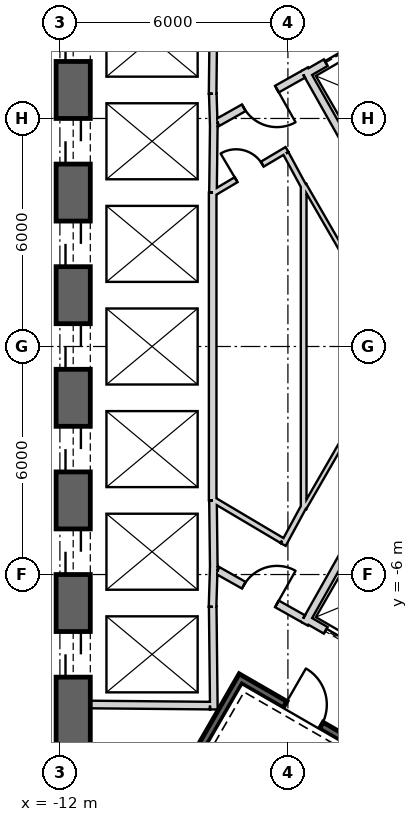
"""IFC4 building model, lengths in metres.
Left out: names, types, materials, properties, quantities, classifications, styles, units other than length and angle.
Written with IfcOpenShell. Run it as: python <this file> out.ifc"""

import sys

from ifc_helpers import new_model, si_unit, direction, frame, frame_2d, origin, place, context, subcontext, project, spatial, rectangle, extrude, element, fill, save


model = new_model("IFC4")
c1 = context("Model", 3, precision=1e-05, world=origin(), true_north=direction((0.0, 1.0)))
c2 = subcontext(c1, "Body", "Model", "MODEL_VIEW")
j1 = project(units=[si_unit("LENGTHUNIT", "METRE"), si_unit("PLANEANGLEUNIT", "RADIAN")], contexts=[c1])
p1 = place(None, origin())
s1 = spatial("IfcSite", under=j1, at=p1, CompositionType="ELEMENT")
p2 = place(p1, origin())
s2 = spatial("IfcBuilding", under=s1, at=p2, CompositionType="ELEMENT")
p3 = place(p2, frame((0.0, 0.0, 392.3)))
s3 = spatial("IfcBuildingStorey", under=s2, at=p3, CompositionType="ELEMENT", Elevation=392.3)
p4 = place(p3, frame((19.475, 2.208, 0.0), z_axis=(0.0, 0.0, 1.0), x_axis=(-0.866028369851, 0.499994862586, 0.0)))
e1 = element("IfcWall", 1, at=p4, inside=s3, PredefinedType="SHEAR", context=c2, shape_type="SweptSolid", body=[
    extrude(rectangle(XDim=31.523, YDim=0.9, at=frame_2d((15.762, 0.0))), origin(), (0.0, 0.0, 1.0), 6.0),
])
p5 = place(p4, frame((7.062, 0.0, 0.0)))
e2 = element("IfcOpeningElement", 2, at=p5, cuts=e1, PredefinedType="OPENING", context=c2, shape_type="SweptSolid", body=[
    extrude(rectangle(XDim=1.2, YDim=2.4, at=frame_2d((0.6, 1.2))), frame((0.0, 0.46, 0.0), z_axis=(0.0, -1.0, 0.0), x_axis=(1.0, 0.0, 0.0)), (0.0, 0.0, 1.0), 0.92),
])
p6 = place(p4, frame((3.612, 0.0, 0.0)))
e3 = element("IfcOpeningElement", 3, at=p6, cuts=e1, PredefinedType="OPENING", context=c2, shape_type="SweptSolid", body=[
    extrude(rectangle(XDim=1.2, YDim=2.4, at=frame_2d((0.6, 1.2))), frame((0.0, 0.46, 0.0), z_axis=(0.0, -1.0, 0.0), x_axis=(1.0, 0.0, 0.0)), (0.0, 0.0, 1.0), 0.92),
])
p7 = place(p4, frame((26.712, 0.0, 0.0)))
e4 = element("IfcOpeningElement", 4, at=p7, cuts=e1, PredefinedType="OPENING", context=c2, shape_type="SweptSolid", body=[
    extrude(rectangle(XDim=1.2, YDim=2.4, at=frame_2d((0.6, 1.2))), frame((0.0, 0.46, 0.0), z_axis=(0.0, -1.0, 0.0), x_axis=(1.0, 0.0, 0.0)), (0.0, 0.0, 1.0), 0.92),
])
p8 = place(p3, frame((-11.65, 15.762, 0.0), z_axis=(0.0, 0.0, 1.0), x_axis=(0.0, -1.0, 0.0)))
e5 = element("IfcWall", 5, at=p8, inside=s3, PredefinedType="SHEAR", context=c2, shape_type="SweptSolid", body=[
    extrude(rectangle(XDim=31.523, YDim=0.9, at=frame_2d((15.762, 0.0))), origin(), (0.0, 0.0, 1.0), 6.0),
])
p9 = place(p8, frame((7.062, 0.0, 0.0)))
e6 = element("IfcOpeningElement", 6, at=p9, cuts=e5, PredefinedType="OPENING", context=c2, shape_type="SweptSolid", body=[
    extrude(rectangle(XDim=1.2, YDim=2.4, at=frame_2d((0.6, 1.2))), frame((0.0, 0.46, 0.0), z_axis=(0.0, -1.0, 0.0), x_axis=(1.0, 0.0, 0.0)), (0.0, 0.0, 1.0), 0.92),
])
p10 = place(p8, frame((9.762, 0.0, 0.0)))
e7 = element("IfcOpeningElement", 7, at=p10, cuts=e5, PredefinedType="OPENING", context=c2, shape_type="SweptSolid", body=[
    extrude(rectangle(XDim=1.2, YDim=2.4, at=frame_2d((0.6, 1.2))), frame((0.0, 0.46, 0.0), z_axis=(0.0, -1.0, 0.0), x_axis=(1.0, 0.0, 0.0)), (0.0, 0.0, 1.0), 0.92),
])
p11 = place(p8, frame((12.462, 0.0, 0.0)))
e8 = element("IfcOpeningElement", 8, at=p11, cuts=e5, PredefinedType="OPENING", context=c2, shape_type="SweptSolid", body=[
    extrude(rectangle(XDim=1.2, YDim=2.4, at=frame_2d((0.6, 1.2))), frame((0.0, 0.46, 0.0), z_axis=(0.0, -1.0, 0.0), x_axis=(1.0, 0.0, 0.0)), (0.0, 0.0, 1.0), 0.92),
])
p12 = place(p8, frame((15.162, 0.0, 0.0)))
e9 = element("IfcOpeningElement", 9, at=p12, cuts=e5, PredefinedType="OPENING", context=c2, shape_type="SweptSolid", body=[
    extrude(rectangle(XDim=1.2, YDim=2.4, at=frame_2d((0.6, 1.2))), frame((0.0, 0.46, 0.0), z_axis=(0.0, -1.0, 0.0), x_axis=(1.0, 0.0, 0.0)), (0.0, 0.0, 1.0), 0.92),
])
p13 = place(p8, frame((17.862, 0.0, 0.0)))
e10 = element("IfcOpeningElement", 10, at=p13, cuts=e5, PredefinedType="OPENING", context=c2, shape_type="SweptSolid", body=[
    extrude(rectangle(XDim=1.2, YDim=2.4, at=frame_2d((0.6, 1.2))), frame((0.0, 0.46, 0.0), z_axis=(0.0, -1.0, 0.0), x_axis=(1.0, 0.0, 0.0)), (0.0, 0.0, 1.0), 0.92),
])
p14 = place(p8, frame((20.562, 0.0, 0.0)))
e11 = element("IfcOpeningElement", 11, at=p14, cuts=e5, PredefinedType="OPENING", context=c2, shape_type="SweptSolid", body=[
    extrude(rectangle(XDim=1.2, YDim=2.4, at=frame_2d((0.6, 1.2))), frame((0.0, 0.46, 0.0), z_axis=(0.0, -1.0, 0.0), x_axis=(1.0, 0.0, 0.0)), (0.0, 0.0, 1.0), 0.92),
])
p15 = place(p8, frame((23.262, 0.0, 0.0)))
e12 = element("IfcOpeningElement", 12, at=p15, cuts=e5, PredefinedType="OPENING", context=c2, shape_type="SweptSolid", body=[
    extrude(rectangle(XDim=1.2, YDim=2.4, at=frame_2d((0.6, 1.2))), frame((0.0, 0.46, 0.0), z_axis=(0.0, -1.0, 0.0), x_axis=(1.0, 0.0, 0.0)), (0.0, 0.0, 1.0), 0.92),
])
p16 = place(p8, frame((3.612, 0.0, 0.0)))
e13 = element("IfcOpeningElement", 13, at=p16, cuts=e5, PredefinedType="OPENING", context=c2, shape_type="SweptSolid", body=[
    extrude(rectangle(XDim=1.2, YDim=2.4, at=frame_2d((0.6, 1.2))), frame((0.0, 0.46, 0.0), z_axis=(0.0, -1.0, 0.0), x_axis=(1.0, 0.0, 0.0)), (0.0, 0.0, 1.0), 0.92),
])
p17 = place(p8, frame((26.712, 0.0, 0.0)))
e14 = element("IfcOpeningElement", 14, at=p17, cuts=e5, PredefinedType="OPENING", context=c2, shape_type="SweptSolid", body=[
    extrude(rectangle(XDim=1.2, YDim=2.4, at=frame_2d((0.6, 1.2))), frame((0.0, 0.46, 0.0), z_axis=(0.0, -1.0, 0.0), x_axis=(1.0, 0.0, 0.0)), (0.0, 0.0, 1.0), 0.92),
])
p18 = place(p3, frame((-7.825, -17.97, 0.0), z_axis=(0.0, 0.0, 1.0), x_axis=(0.866028369851, 0.499994862586, 0.0)))
e15 = element("IfcWall", 15, at=p18, inside=s3, PredefinedType="SHEAR", context=c2, shape_type="SweptSolid", body=[
    extrude(rectangle(XDim=31.523, YDim=0.9, at=frame_2d((15.762, 0.0))), origin(), (0.0, 0.0, 1.0), 6.0),
])
p19 = place(p18, frame((7.062, 0.0, 0.0)))
e16 = element("IfcOpeningElement", 16, at=p19, cuts=e15, PredefinedType="OPENING", context=c2, shape_type="SweptSolid", body=[
    extrude(rectangle(XDim=1.2, YDim=2.4, at=frame_2d((0.6, 1.2))), frame((0.0, 0.46, 0.0), z_axis=(0.0, -1.0, 0.0), x_axis=(1.0, 0.0, 0.0)), (0.0, 0.0, 1.0), 0.92),
])
p20 = place(p18, frame((9.762, 0.0, 0.0)))
e17 = element("IfcOpeningElement", 17, at=p20, cuts=e15, PredefinedType="OPENING", context=c2, shape_type="SweptSolid", body=[
    extrude(rectangle(XDim=1.2, YDim=2.4, at=frame_2d((0.6, 1.2))), frame((0.0, 0.46, 0.0), z_axis=(0.0, -1.0, 0.0), x_axis=(1.0, 0.0, 0.0)), (0.0, 0.0, 1.0), 0.92),
])
p21 = place(p18, frame((17.862, 0.0, 0.0)))
e18 = element("IfcOpeningElement", 18, at=p21, cuts=e15, PredefinedType="OPENING", context=c2, shape_type="SweptSolid", body=[
    extrude(rectangle(XDim=1.2, YDim=2.4, at=frame_2d((0.6, 1.2))), frame((0.0, 0.46, 0.0), z_axis=(0.0, -1.0, 0.0), x_axis=(1.0, 0.0, 0.0)), (0.0, 0.0, 1.0), 0.92),
])
p22 = place(p18, frame((20.562, 0.0, 0.0)))
e19 = element("IfcOpeningElement", 19, at=p22, cuts=e15, PredefinedType="OPENING", context=c2, shape_type="SweptSolid", body=[
    extrude(rectangle(XDim=1.2, YDim=2.4, at=frame_2d((0.6, 1.2))), frame((0.0, 0.46, 0.0), z_axis=(0.0, -1.0, 0.0), x_axis=(1.0, 0.0, 0.0)), (0.0, 0.0, 1.0), 0.92),
])
p23 = place(p18, frame((26.712, 0.0, 0.0)))
e20 = element("IfcOpeningElement", 20, at=p23, cuts=e15, PredefinedType="OPENING", context=c2, shape_type="SweptSolid", body=[
    extrude(rectangle(XDim=1.2, YDim=2.4, at=frame_2d((0.6, 1.2))), frame((0.0, 0.46, 0.0), z_axis=(0.0, -1.0, 0.0), x_axis=(1.0, 0.0, 0.0)), (0.0, 0.0, 1.0), 0.92),
])
p24 = place(p18, frame((3.612, 0.0, 0.0)))
e21 = element("IfcOpeningElement", 21, at=p24, cuts=e15, PredefinedType="OPENING", context=c2, shape_type="SweptSolid", body=[
    extrude(rectangle(XDim=1.2, YDim=2.4, at=frame_2d((0.6, 1.2))), frame((0.0, 0.46, 0.0), z_axis=(0.0, -1.0, 0.0), x_axis=(1.0, 0.0, 0.0)), (0.0, 0.0, 1.0), 0.92),
])
p25 = place(p3, frame((-7.951, 9.35, 0.0), z_axis=(0.0, 0.0, 1.0), x_axis=(-0.011120469654, -0.999938165666, 0.0)))
e22 = element("IfcWall", 22, at=p25, inside=s3, PredefinedType="PLUMBINGWALL", context=c2, shape_type="SweptSolid", body=[
    extrude(rectangle(XDim=2.7, YDim=0.2, at=frame_2d((1.35, 0.0))), origin(), (0.0, 0.0, 1.0), 5.7),
])
p26 = place(p3, frame((-7.977, 6.65, 0.0), z_axis=(0.0, 0.0, 1.0), x_axis=(0.030861509705, -0.999523670164, 0.0)))
e23 = element("IfcWall", 23, at=p26, inside=s3, PredefinedType="PLUMBINGWALL", context=c2, shape_type="SweptSolid", body=[
    extrude(rectangle(XDim=0.878, YDim=0.2, at=frame_2d((0.439, 0.0))), origin(), (0.0, 0.0, 1.0), 5.7),
])
p27 = place(p3, frame((-7.949, 5.895, 0.0), z_axis=(0.0, 0.0, 1.0), x_axis=(-0.012042535896, -0.999927486035, 0.0)))
e24 = element("IfcWall", 24, at=p27, inside=s3, PredefinedType="PLUMBINGWALL", context=c2, shape_type="SweptSolid", body=[
    extrude(rectangle(XDim=1.845, YDim=0.2, at=frame_2d((0.922, 0.0))), origin(), (0.0, 0.0, 1.0), 5.7),
])
p28 = place(p3, frame((-7.98, 4.05, 0.0), z_axis=(0.0, 0.0, 1.0), x_axis=(0.0, -1.0, 0.0)))
e25 = element("IfcWall", 25, at=p28, inside=s3, PredefinedType="PLUMBINGWALL", context=c2, shape_type="SweptSolid", body=[
    extrude(rectangle(XDim=8.1, YDim=0.2, at=frame_2d((4.05, 0.0))), origin(), (0.0, 0.0, 1.0), 5.7),
])
p29 = place(p3, frame((-7.95, -5.772, 0.0), z_axis=(0.0, 0.0, 1.0), x_axis=(-0.030803413295, -0.999525462272, 0.0)))
e26 = element("IfcWall", 26, at=p29, inside=s3, PredefinedType="PLUMBINGWALL", context=c2, shape_type="SweptSolid", body=[
    extrude(rectangle(XDim=1.078, YDim=0.2, at=frame_2d((0.539, 0.0))), origin(), (0.0, 0.0, 1.0), 5.7),
])
p30 = place(p3, frame((-7.971, -4.05, 0.0), z_axis=(0.0, 0.0, 1.0), x_axis=(0.012042535896, -0.999927486035, 0.0)))
e27 = element("IfcWall", 27, at=p30, inside=s3, PredefinedType="PLUMBINGWALL", context=c2, shape_type="SweptSolid", body=[
    extrude(rectangle(XDim=1.845, YDim=0.2, at=frame_2d((0.922, 0.0))), origin(), (0.0, 0.0, 1.0), 5.7),
])
p31 = place(p3, frame((-7.979, -6.85, 0.0), z_axis=(0.0, 0.0, 1.0), x_axis=(0.011121475088, -0.999938154483, 0.0)))
e28 = element("IfcWall", 28, at=p31, inside=s3, PredefinedType="PLUMBINGWALL", context=c2, shape_type="SweptSolid", body=[
    extrude(rectangle(XDim=2.7, YDim=0.2, at=frame_2d((1.35, 0.0))), origin(), (0.0, 0.0, 1.0), 5.7),
])
p32 = place(p3, frame((-8.05, -9.449, 0.0), z_axis=(0.0, 0.0, 1.0), x_axis=(-0.999957467379, 0.009222983926, 0.0)))
e29 = element("IfcWall", 29, at=p32, inside=s3, PredefinedType="PLUMBINGWALL", context=c2, shape_type="SweptSolid", body=[
    extrude(rectangle(XDim=3.15, YDim=0.2, at=frame_2d((1.575, 0.0))), origin(), (0.0, 0.0, 1.0), 5.7),
])
p33 = place(p3, frame((-5.524, 7.168, 0.0), z_axis=(0.0, 0.0, 1.0), x_axis=(0.866024647952, 0.500001309137, 0.0)))
e30 = element("IfcWall", 30, at=p33, inside=s3, PredefinedType="PLUMBINGWALL", context=c2, shape_type="SweptSolid", body=[
    extrude(rectangle(XDim=2.4, YDim=0.2, at=frame_2d((1.2, 0.0))), origin(), (0.0, 0.0, 1.0), 5.7),
])
p34 = place(p33, frame((0.6, 0.0, 0.0)))
e31 = element("IfcOpeningElement", 31, at=p34, cuts=e30, PredefinedType="OPENING", context=c2, shape_type="SweptSolid", body=[
    extrude(rectangle(XDim=1.2, YDim=2.4, at=frame_2d((0.6, 1.2))), frame((0.0, 0.11, 0.0), z_axis=(0.0, -1.0, 0.0), x_axis=(1.0, 0.0, 0.0)), (0.0, 0.0, 1.0), 0.22),
])
p35 = place(p3, frame((-5.562, 7.296, 0.0), z_axis=(0.0, 0.0, 1.0), x_axis=(0.49134651263, -0.870964180966, 0.0)))
e32 = element("IfcWall", 32, at=p35, inside=s3, PredefinedType="PLUMBINGWALL", context=c2, shape_type="SweptSolid", body=[
    extrude(rectangle(XDim=3.0, YDim=0.2, at=frame_2d((1.5, 0.0))), origin(), (0.0, 0.0, 1.0), 5.7),
])
p36 = place(p3, frame((-7.196, -8.663, -0.35), z_axis=(0.0, 0.0, 1.0), x_axis=(-0.499997992926, -0.866026562566, 0.0)))
e33 = element("IfcWall", 33, at=p36, inside=s3, PredefinedType="SHEAR", context=c2, shape_type="SweptSolid", body=[
    extrude(rectangle(XDim=7.9, YDim=0.2, at=frame_2d((3.95, 0.0))), origin(), (0.0, 0.0, 1.0), 6.05),
])
p37 = place(p3, frame((-4.041, -10.599, -0.35), z_axis=(0.0, 0.0, 1.0), x_axis=(-0.866047807691, 0.499961193289, 0.0)))
e34 = element("IfcWall", 34, at=p37, inside=s3, PredefinedType="SHEAR", context=c2, shape_type="SweptSolid", body=[
    extrude(rectangle(XDim=3.6, YDim=0.2, at=frame_2d((1.8, 0.0))), origin(), (0.0, 0.0, 1.0), 6.05),
])
p38 = place(p37, frame((1.25, 0.0, 0.35)))
e35 = element("IfcOpeningElement", 35, at=p38, cuts=e34, PredefinedType="OPENING", context=c2, shape_type="SweptSolid", body=[
    extrude(rectangle(XDim=1.1, YDim=2.1, at=frame_2d((0.55, 1.05))), frame((0.0, 0.11, 0.0), z_axis=(0.0, -1.0, 0.0), x_axis=(1.0, 0.0, 0.0)), (0.0, 0.0, 1.0), 0.22),
])
p39 = place(p3, frame((-3.446, -8.368, 0.0), z_axis=(0.0, 0.0, 1.0), x_axis=(-0.866024647952, 0.500001309137, 0.0)))
e36 = element("IfcWall", 36, at=p39, inside=s3, PredefinedType="PLUMBINGWALL", context=c2, shape_type="SweptSolid", body=[
    extrude(rectangle(XDim=2.4, YDim=0.2, at=frame_2d((1.2, 0.0))), origin(), (0.0, 0.0, 1.0), 5.7),
])
p40 = place(p39, frame((0.6, 0.0, 0.0)))
e37 = element("IfcOpeningElement", 37, at=p40, cuts=e36, PredefinedType="OPENING", context=c2, shape_type="SweptSolid", body=[
    extrude(rectangle(XDim=1.2, YDim=2.4, at=frame_2d((0.6, 1.2))), frame((0.0, 0.11, 0.0), z_axis=(0.0, -1.0, 0.0), x_axis=(1.0, 0.0, 0.0)), (0.0, 0.0, 1.0), 0.22),
])
p41 = place(p3, frame((-3.99, -4.509, 0.0), z_axis=(0.0, 0.0, 1.0), x_axis=(-0.491358283181, -0.870957540612, 0.0)))
e38 = element("IfcWall", 38, at=p41, inside=s3, PredefinedType="PLUMBINGWALL", context=c2, shape_type="SweptSolid", body=[
    extrude(rectangle(XDim=3.2, YDim=0.2, at=frame_2d((1.6, 0.0))), origin(), (0.0, 0.0, 1.0), 5.7),
])
p42 = place(p3, frame((-5.6, 7.16, 0.0), z_axis=(0.0, 0.0, 1.0), x_axis=(-0.871363259478, -0.490638431059, 0.0)))
e39 = element("IfcWall", 39, at=p42, inside=s3, PredefinedType="PARTITIONING", context=c2, shape_type="SweptSolid", body=[
    extrude(rectangle(XDim=2.581, YDim=0.2, at=frame_2d((1.291, 0.0))), origin(), (0.0, 0.0, 1.0), 5.7),
])
p43 = place(p42, frame((0.791, 0.0, 0.0)))
e40 = element("IfcOpeningElement", 40, at=p43, cuts=e39, PredefinedType="OPENING", context=c2, shape_type="SweptSolid", body=[
    extrude(rectangle(XDim=1.0, YDim=2.1, at=frame_2d((0.5, 1.05))), frame((0.0, 0.11, 0.0), z_axis=(0.0, -1.0, 0.0), x_axis=(1.0, 0.0, 0.0)), (0.0, 0.0, 1.0), 0.22),
])
p44 = place(p3, frame((-7.849, -5.894, 0.0), z_axis=(0.0, 0.0, 1.0), x_axis=(0.871363259478, -0.490638431059, 0.0)))
e41 = element("IfcWall", 41, at=p44, inside=s3, PredefinedType="PARTITIONING", context=c2, shape_type="SweptSolid", body=[
    extrude(rectangle(XDim=2.581, YDim=0.2, at=frame_2d((1.291, 0.0))), origin(), (0.0, 0.0, 1.0), 5.7),
])
p45 = place(p44, frame((0.791, 0.0, 0.0)))
e42 = element("IfcOpeningElement", 42, at=p45, cuts=e41, PredefinedType="OPENING", context=c2, shape_type="SweptSolid", body=[
    extrude(rectangle(XDim=1.0, YDim=2.1, at=frame_2d((0.5, 1.05))), frame((0.0, 0.11, 0.0), z_axis=(0.0, -1.0, 0.0), x_axis=(1.0, 0.0, 0.0)), (0.0, 0.0, 1.0), 0.22),
])
p46 = place(p3, frame((-5.586, -4.275, 0.0), z_axis=(0.0, 0.0, 1.0), x_axis=(0.0, 1.0, 0.0)))
e43 = element("IfcWall", 43, at=p46, inside=s3, PredefinedType="PLUMBINGWALL", context=c2, shape_type="SweptSolid", body=[
    extrude(rectangle(XDim=8.549, YDim=0.15, at=frame_2d((4.275, 0.0))), origin(), (0.0, 0.0, 1.0), 5.7),
])
p47 = place(p3, frame((-6.124, -5.211, 0.0), z_axis=(0.0, 0.0, 1.0), x_axis=(0.476228984866, 0.879321303036, 0.0)))
e44 = element("IfcWall", 44, at=p47, inside=s3, PredefinedType="PLUMBINGWALL", context=c2, shape_type="SweptSolid", body=[
    extrude(rectangle(XDim=1.162, YDim=0.15, at=frame_2d((0.581, 0.0))), origin(), (0.0, 0.0, 1.0), 5.7),
])
p48 = place(p3, frame((-7.95, -4.041, 0.0), z_axis=(0.0, 0.0, 1.0), x_axis=(0.860090281069, -0.510141851263, 0.0)))
e45 = element("IfcWall", 45, at=p48, inside=s3, PredefinedType="PLUMBINGWALL", context=c2, shape_type="SweptSolid", body=[
    extrude(rectangle(XDim=2.089, YDim=0.15, at=frame_2d((1.045, 0.0))), origin(), (0.0, 0.0, 1.0), 5.7),
])
p49 = place(p3, frame((-6.024, 5.183, 0.0), z_axis=(0.0, 0.0, 1.0), x_axis=(-0.860126804455, -0.510080268447, 0.0)))
e46 = element("IfcWall", 46, at=p49, inside=s3, PredefinedType="PLUMBINGWALL", context=c2, shape_type="SweptSolid", body=[
    extrude(rectangle(XDim=2.24, YDim=0.15, at=frame_2d((1.12, 0.0))), origin(), (0.0, 0.0, 1.0), 5.7),
])
p50 = place(p49, frame((0.757, 0.0, 0.0)))
e47 = element("IfcOpeningElement", 47, at=p50, cuts=e46, PredefinedType="OPENING", context=c2, shape_type="SweptSolid", body=[
    extrude(rectangle(XDim=0.8, YDim=2.1, at=frame_2d((0.4, 1.05))), frame((0.0, 0.085, 0.0), z_axis=(0.0, -1.0, 0.0), x_axis=(1.0, 0.0, 0.0)), (0.0, 0.0, 1.0), 0.17),
])
p51 = place(p3, frame((-5.571, 4.19, 0.0), z_axis=(0.0, 0.0, 1.0), x_axis=(-0.476127658675, 0.879376172434, 0.0)))
e48 = element("IfcWall", 48, at=p51, inside=s3, PredefinedType="PLUMBINGWALL", context=c2, shape_type="SweptSolid", body=[
    extrude(rectangle(XDim=1.012, YDim=0.15, at=frame_2d((0.506, 0.0))), origin(), (0.0, 0.0, 1.0), 5.7),
])
p52 = place(p3, frame((-4.558, 2.495, 0.0), z_axis=(0.0, 0.0, 1.0), x_axis=(-0.499990325971, 0.866030989016, 0.0)))
e49 = element("IfcWall", 49, at=p52, inside=s3, PredefinedType="PARTITIONING", context=c2, shape_type="SweptSolid", body=[
    extrude(rectangle(XDim=2.025, YDim=0.12, at=frame_2d((1.012, 0.0))), origin(), (0.0, 0.0, 1.0), 5.7),
])
p53 = place(p3, frame((-4.64, -2.517, 0.0), z_axis=(0.0, 0.0, 1.0), x_axis=(0.865989465428, -0.500062241894, 0.0)))
e50 = element("IfcWall", 50, at=p53, inside=s3, PredefinedType="PARTITIONING", context=c2, shape_type="SweptSolid", body=[
    extrude(rectangle(XDim=1.7, YDim=0.12, at=frame_2d((0.85, 0.0))), origin(), (0.0, 0.0, 1.0), 5.7),
])
p54 = place(p3, frame((-5.571, -4.249, 0.0), z_axis=(0.0, 0.0, 1.0), x_axis=(0.500081145431, 0.865978549379, 0.0)))
e51 = element("IfcWall", 51, at=p54, inside=s3, PredefinedType="PARTITIONING", context=c2, shape_type="SweptSolid", body=[
    extrude(rectangle(XDim=1.905, YDim=0.12, at=frame_2d((0.953, 0.0))), origin(), (0.0, 0.0, 1.0), 5.7),
])
p55 = place(p43, origin())
e52 = element("IfcDoor", 52, at=p55, inside=s3, OperationType="SINGLE_SWING_LEFT", PredefinedType="USERDEFINED", context=c2, shape_type="SweptSolid", body=[
    extrude(rectangle(XDim=1.0, YDim=2.1, at=frame_2d((0.5, 1.05))), frame((0.0, 0.025, 0.0), z_axis=(0.0, -1.0, 0.0), x_axis=(1.0, 0.0, 0.0)), (0.0, 0.0, 1.0), 0.05),
])
fill(e40, e52)
p56 = place(p34, origin())
e53 = element("IfcDoor", 53, at=p56, inside=s3, OperationType="SLIDING_TO_LEFT", PredefinedType="USERDEFINED", context=c2, shape_type="SweptSolid", body=[
    extrude(rectangle(XDim=1.2, YDim=2.4, at=frame_2d((0.6, 1.2))), frame((0.0, 0.025, 0.0), z_axis=(0.0, -1.0, 0.0), x_axis=(1.0, 0.0, 0.0)), (0.0, 0.0, 1.0), 0.05),
])
fill(e31, e53)
p57 = place(p38, origin())
e54 = element("IfcDoor", 54, at=p57, inside=s3, OperationType="SINGLE_SWING_RIGHT", PredefinedType="USERDEFINED", context=c2, shape_type="SweptSolid", body=[
    extrude(rectangle(XDim=1.1, YDim=2.1, at=frame_2d((0.55, 1.05))), frame((0.0, 0.025, 0.0), z_axis=(0.0, -1.0, 0.0), x_axis=(1.0, 0.0, 0.0)), (0.0, 0.0, 1.0), 0.05),
])
fill(e35, e54)
p58 = place(p45, origin())
e55 = element("IfcDoor", 55, at=p58, inside=s3, OperationType="SINGLE_SWING_RIGHT", PredefinedType="USERDEFINED", context=c2, shape_type="SweptSolid", body=[
    extrude(rectangle(XDim=1.0, YDim=2.1, at=frame_2d((0.5, 1.05))), frame((0.0, 0.025, 0.0), z_axis=(0.0, -1.0, 0.0), x_axis=(1.0, 0.0, 0.0)), (0.0, 0.0, 1.0), 0.05),
])
fill(e42, e55)
p59 = place(p40, origin())
e56 = element("IfcDoor", 56, at=p59, inside=s3, OperationType="SLIDING_TO_LEFT", PredefinedType="USERDEFINED", context=c2, shape_type="SweptSolid", body=[
    extrude(rectangle(XDim=1.2, YDim=2.4, at=frame_2d((0.6, 1.2))), frame((0.0, 0.025, 0.0), z_axis=(0.0, -1.0, 0.0), x_axis=(1.0, 0.0, 0.0)), (0.0, 0.0, 1.0), 0.05),
])
fill(e37, e56)
p60 = place(p50, origin())
e57 = element("IfcDoor", 57, at=p60, inside=s3, OperationType="SINGLE_SWING_RIGHT", PredefinedType="USERDEFINED", context=c2, shape_type="SweptSolid", body=[
    extrude(rectangle(XDim=0.8, YDim=2.1, at=frame_2d((0.4, 1.05))), frame((0.0, 0.025, 0.0), z_axis=(0.0, -1.0, 0.0), x_axis=(1.0, 0.0, 0.0)), (0.0, 0.0, 1.0), 0.05),
])
fill(e47, e57)
p61 = place(p9, origin())
e58 = element("IfcDoor", 58, at=p61, inside=s3, OperationType="SLIDING_TO_LEFT", PredefinedType="USERDEFINED", context=c2, shape_type="SweptSolid", body=[
    extrude(rectangle(XDim=1.2, YDim=2.4, at=frame_2d((0.6, 1.2))), frame((0.0, 0.025, 0.0), z_axis=(0.0, -1.0, 0.0), x_axis=(1.0, 0.0, 0.0)), (0.0, 0.0, 1.0), 0.05),
])
fill(e6, e58)
p62 = place(p10, origin())
e59 = element("IfcDoor", 59, at=p62, inside=s3, OperationType="SLIDING_TO_LEFT", PredefinedType="USERDEFINED", context=c2, shape_type="SweptSolid", body=[
    extrude(rectangle(XDim=1.2, YDim=2.4, at=frame_2d((0.6, 1.2))), frame((0.0, 0.025, 0.0), z_axis=(0.0, -1.0, 0.0), x_axis=(1.0, 0.0, 0.0)), (0.0, 0.0, 1.0), 0.05),
])
fill(e7, e59)
p63 = place(p11, origin())
e60 = element("IfcDoor", 60, at=p63, inside=s3, OperationType="SLIDING_TO_LEFT", PredefinedType="USERDEFINED", context=c2, shape_type="SweptSolid", body=[
    extrude(rectangle(XDim=1.2, YDim=2.4, at=frame_2d((0.6, 1.2))), frame((0.0, 0.025, 0.0), z_axis=(0.0, -1.0, 0.0), x_axis=(1.0, 0.0, 0.0)), (0.0, 0.0, 1.0), 0.05),
])
fill(e8, e60)
p64 = place(p12, origin())
e61 = element("IfcDoor", 61, at=p64, inside=s3, OperationType="SLIDING_TO_LEFT", PredefinedType="USERDEFINED", context=c2, shape_type="SweptSolid", body=[
    extrude(rectangle(XDim=1.2, YDim=2.4, at=frame_2d((0.6, 1.2))), frame((0.0, 0.025, 0.0), z_axis=(0.0, -1.0, 0.0), x_axis=(1.0, 0.0, 0.0)), (0.0, 0.0, 1.0), 0.05),
])
fill(e9, e61)
p65 = place(p13, origin())
e62 = element("IfcDoor", 62, at=p65, inside=s3, OperationType="SLIDING_TO_LEFT", PredefinedType="USERDEFINED", context=c2, shape_type="SweptSolid", body=[
    extrude(rectangle(XDim=1.2, YDim=2.4, at=frame_2d((0.6, 1.2))), frame((0.0, 0.025, 0.0), z_axis=(0.0, -1.0, 0.0), x_axis=(1.0, 0.0, 0.0)), (0.0, 0.0, 1.0), 0.05),
])
fill(e10, e62)
p66 = place(p14, origin())
e63 = element("IfcDoor", 63, at=p66, inside=s3, OperationType="SLIDING_TO_LEFT", PredefinedType="USERDEFINED", context=c2, shape_type="SweptSolid", body=[
    extrude(rectangle(XDim=1.2, YDim=2.4, at=frame_2d((0.6, 1.2))), frame((0.0, 0.025, 0.0), z_axis=(0.0, -1.0, 0.0), x_axis=(1.0, 0.0, 0.0)), (0.0, 0.0, 1.0), 0.05),
])
fill(e11, e63)
p67 = place(p15, origin())
e64 = element("IfcDoor", 64, at=p67, inside=s3, OperationType="SLIDING_TO_LEFT", PredefinedType="USERDEFINED", context=c2, shape_type="SweptSolid", body=[
    extrude(rectangle(XDim=1.2, YDim=2.4, at=frame_2d((0.6, 1.2))), frame((0.0, 0.025, 0.0), z_axis=(0.0, -1.0, 0.0), x_axis=(1.0, 0.0, 0.0)), (0.0, 0.0, 1.0), 0.05),
])
fill(e12, e64)
save(model, sys.argv[1])
